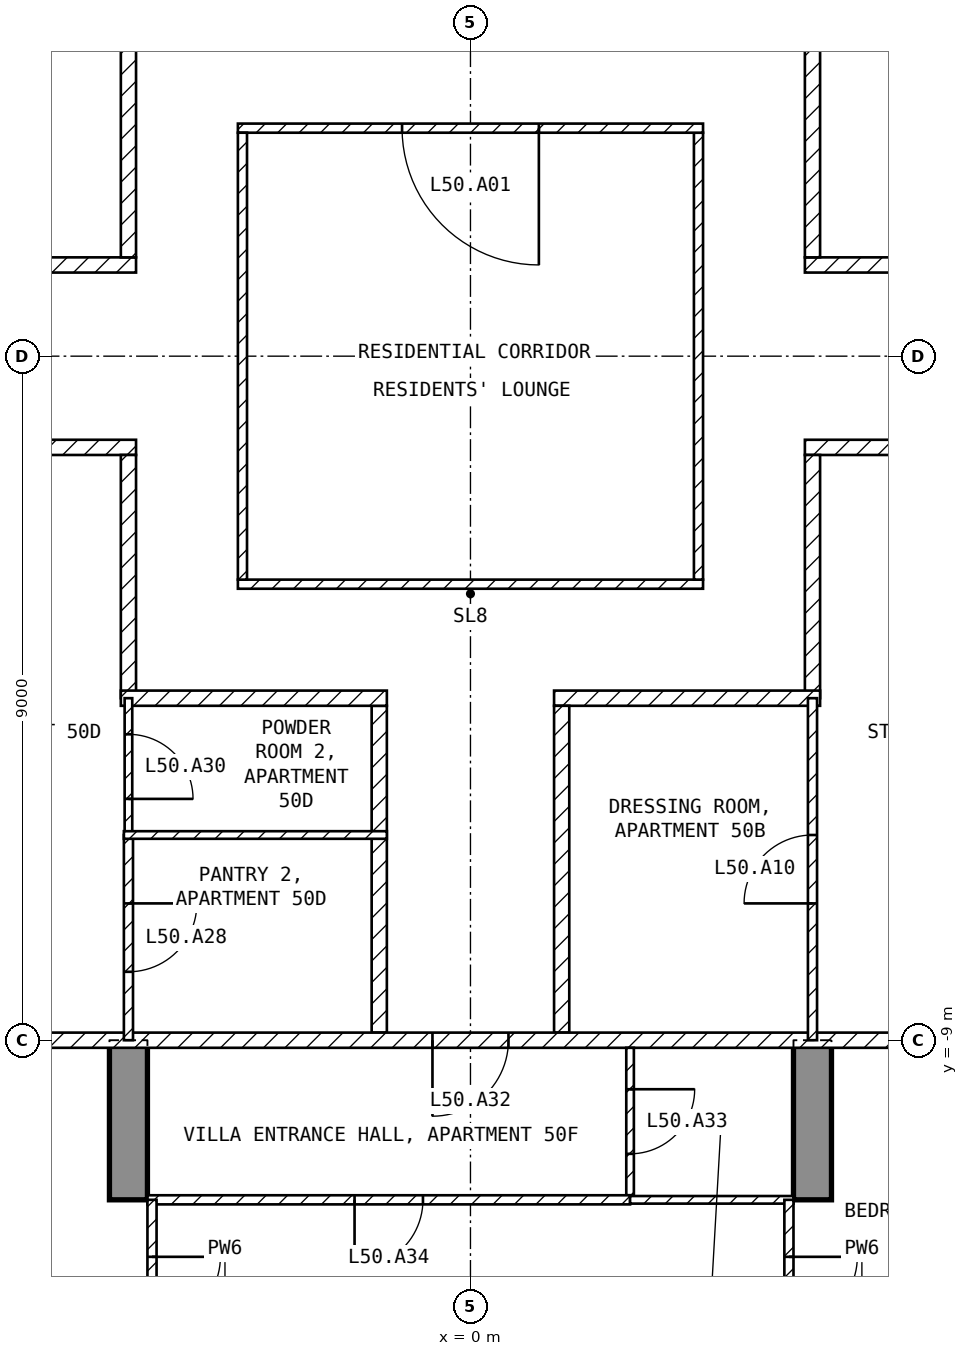
"""IFC4 building model, lengths in metres.
Left out: names, types, materials, properties, quantities, classifications, styles, units other than length and angle.
Written with IfcOpenShell. Run it as: python <this file> out.ifc"""

import sys

from ifc_helpers import new_model, si_unit, direction, frame, frame_2d, origin, place, context, subcontext, project, spatial, polyline, rectangle, outline, extrude, element, fill, save


model = new_model("IFC4")
c1 = context("Model", 3, precision=1e-05, world=origin(), true_north=direction((0.0, 1.0)))
c2 = subcontext(c1, "Body", "Model", "MODEL_VIEW")
j1 = project(units=[si_unit("LENGTHUNIT", "METRE"), si_unit("PLANEANGLEUNIT", "RADIAN")], contexts=[c1])
p1 = place(None, origin())
s1 = spatial("IfcSite", under=j1, at=p1, CompositionType="ELEMENT")
p2 = place(p1, origin())
s2 = spatial("IfcBuilding", under=s1, at=p2, CompositionType="ELEMENT")
p3 = place(p2, frame((0.0, 0.0, 201.6)))
s3 = spatial("IfcBuildingStorey", under=s2, at=p3, CompositionType="ELEMENT", Elevation=201.6)
for number, where, z_axis, x_axis in (
    (1, (-4.75, -20.225, -0.25), (1.0, 0.0, 0.0), (0.0, 1.0, 0.0)),
    (2, (4.25, -20.225, -0.25), (1.0, 0.0, 0.0), (0.0, 1.0, 0.0)),
):
    element("IfcWall", number, at=place(p3, frame(where, z_axis=z_axis, x_axis=x_axis)), inside=s3, PredefinedType="SHEAR", context=c2, shape_type="SweptSolid", body=[
        extrude(outline(polyline([(0.0, 0.0), (6.725, 0.0), (6.725, 2.65), (9.125, 2.65), (9.125, 0.0), (11.225, 0.0), (11.225, 3.5), (0.0, 3.5), (0.0, 0.0)])), origin(), (0.0, 0.0, 1.0), 0.5),
    ])
p4 = place(p3, frame((-3.06, -3.0, 0.0), z_axis=(0.0, 0.0, 1.0), x_axis=(1.0, 0.0, 0.0)))
e3 = element("IfcWall", 3, at=p4, inside=s3, PredefinedType="PARTITIONING", context=c2, shape_type="SweptSolid", body=[
    extrude(rectangle(XDim=6.12, YDim=0.12, at=frame_2d((3.06, 0.0))), origin(), (0.0, 0.0, 1.0), 3.25),
])
p5 = place(p3, frame((3.0, -2.94, 0.0), z_axis=(0.0, 0.0, 1.0), x_axis=(0.0, 1.0, 0.0)))
e4 = element("IfcWall", 4, at=p5, inside=s3, PredefinedType="PARTITIONING", context=c2, shape_type="SweptSolid", body=[
    extrude(rectangle(XDim=5.88, YDim=0.12, at=frame_2d((2.94, 0.0))), origin(), (0.0, 0.0, 1.0), 3.25),
])
p6 = place(p3, frame((3.06, 3.0, 0.0), z_axis=(0.0, 0.0, 1.0), x_axis=(-1.0, 0.0, 0.0)))
e5 = element("IfcWall", 5, at=p6, inside=s3, PredefinedType="PARTITIONING", context=c2, shape_type="SweptSolid", body=[
    extrude(rectangle(XDim=6.12, YDim=0.12, at=frame_2d((3.06, 0.0))), origin(), (0.0, 0.0, 1.0), 3.25),
])
p7 = place(p6, frame((2.16, 0.0, 0.0)))
e6 = element("IfcOpeningElement", 6, at=p7, cuts=e5, PredefinedType="OPENING", context=c2, shape_type="SweptSolid", body=[
    extrude(rectangle(XDim=1.8, YDim=2.1, at=frame_2d((0.9, 1.05))), frame((0.0, 0.07, 0.0), z_axis=(0.0, -1.0, 0.0), x_axis=(1.0, 0.0, 0.0)), (0.0, 0.0, 1.0), 0.14),
])
p8 = place(p3, frame((-3.0, 2.94, 0.0), z_axis=(0.0, 0.0, 1.0), x_axis=(0.0, -1.0, 0.0)))
e7 = element("IfcWall", 7, at=p8, inside=s3, PredefinedType="PARTITIONING", context=c2, shape_type="SweptSolid", body=[
    extrude(rectangle(XDim=5.88, YDim=0.12, at=frame_2d((2.94, 0.0))), origin(), (0.0, 0.0, 1.0), 3.25),
])
p9 = place(p3, frame((4.4, 1.2, 0.0), z_axis=(0.0, 0.0, 1.0), x_axis=(1.0, 0.0, 0.0)))
e8 = element("IfcWall", 8, at=p9, inside=s3, PredefinedType="PARTITIONING", context=c2, shape_type="SweptSolid", body=[
    extrude(rectangle(XDim=17.2, YDim=0.2, at=frame_2d((8.6, 0.0))), origin(), (0.0, 0.0, 1.0), 3.25),
])
p10 = place(p9, frame((12.275, 0.0, 0.0)))
e9 = element("IfcOpeningElement", 9, at=p10, cuts=e8, PredefinedType="OPENING", context=c2, shape_type="SweptSolid", body=[
    extrude(rectangle(XDim=1.0, YDim=2.1, at=frame_2d((0.5, 1.05))), frame((0.0, 0.11, 0.0), z_axis=(0.0, -1.0, 0.0), x_axis=(1.0, 0.0, 0.0)), (0.0, 0.0, 1.0), 0.22),
])
p11 = place(p3, frame((4.5, 4.5, 0.0), z_axis=(0.0, 0.0, 1.0), x_axis=(0.0, -1.0, 0.0)))
e10 = element("IfcWall", 10, at=p11, inside=s3, PredefinedType="PARTITIONING", context=c2, shape_type="SweptSolid", body=[
    extrude(rectangle(XDim=3.2, YDim=0.2, at=frame_2d((1.6, 0.0))), origin(), (0.0, 0.0, 1.0), 3.25),
])
p12 = place(p3, frame((21.6, -1.2, 0.0), z_axis=(0.0, 0.0, 1.0), x_axis=(-1.0, 0.0, 0.0)))
e11 = element("IfcWall", 11, at=p12, inside=s3, PredefinedType="PARTITIONING", context=c2, shape_type="SweptSolid", body=[
    extrude(rectangle(XDim=17.2, YDim=0.2, at=frame_2d((8.6, 0.0))), origin(), (0.0, 0.0, 1.0), 3.25),
])
p13 = place(p12, frame((7.75, 0.0, 0.0)))
e12 = element("IfcOpeningElement", 12, at=p13, cuts=e11, PredefinedType="OPENING", context=c2, shape_type="SweptSolid", body=[
    extrude(rectangle(XDim=1.0, YDim=2.1, at=frame_2d((0.5, 1.05))), frame((0.0, 0.11, 0.0), z_axis=(0.0, -1.0, 0.0), x_axis=(1.0, 0.0, 0.0)), (0.0, 0.0, 1.0), 0.22),
])
p14 = place(p3, frame((4.5, -1.3, 0.0), z_axis=(0.0, 0.0, 1.0), x_axis=(0.0, -1.0, 0.0)))
e13 = element("IfcWall", 13, at=p14, inside=s3, PredefinedType="PARTITIONING", context=c2, shape_type="SweptSolid", body=[
    extrude(rectangle(XDim=3.2, YDim=0.2, at=frame_2d((1.6, 0.0))), origin(), (0.0, 0.0, 1.0), 3.25),
])
p15 = place(p3, frame((4.6, -4.5, 0.0), z_axis=(0.0, 0.0, 1.0), x_axis=(-1.0, 0.0, 0.0)))
e14 = element("IfcWall", 14, at=p15, inside=s3, PredefinedType="PARTITIONING", context=c2, shape_type="SweptSolid", body=[
    extrude(rectangle(XDim=3.5, YDim=0.2, at=frame_2d((1.75, 0.0))), origin(), (0.0, 0.0, 1.0), 3.25),
])
p16 = place(p3, frame((1.2, -4.6, 0.0), z_axis=(0.0, 0.0, 1.0), x_axis=(0.0, -1.0, 0.0)))
e15 = element("IfcWall", 15, at=p16, inside=s3, PredefinedType="PARTITIONING", context=c2, shape_type="SweptSolid", body=[
    extrude(rectangle(XDim=4.3, YDim=0.2, at=frame_2d((2.15, 0.0))), origin(), (0.0, 0.0, 1.0), 3.25),
])
p17 = place(p3, frame((-21.6, 1.2, 0.0), z_axis=(0.0, 0.0, 1.0), x_axis=(1.0, 0.0, 0.0)))
e16 = element("IfcWall", 16, at=p17, inside=s3, PredefinedType="PARTITIONING", context=c2, shape_type="SweptSolid", body=[
    extrude(rectangle(XDim=17.2, YDim=0.2, at=frame_2d((8.6, 0.0))), origin(), (0.0, 0.0, 1.0), 3.25),
])
p18 = place(p17, frame((7.75, 0.0, 0.0)))
e17 = element("IfcOpeningElement", 17, at=p18, cuts=e16, PredefinedType="OPENING", context=c2, shape_type="SweptSolid", body=[
    extrude(rectangle(XDim=1.0, YDim=2.1, at=frame_2d((0.5, 1.05))), frame((0.0, 0.11, 0.0), z_axis=(0.0, -1.0, 0.0), x_axis=(1.0, 0.0, 0.0)), (0.0, 0.0, 1.0), 0.22),
])
p19 = place(p3, frame((-4.5, 1.3, 0.0), z_axis=(0.0, 0.0, 1.0), x_axis=(0.0, 1.0, 0.0)))
e18 = element("IfcWall", 18, at=p19, inside=s3, PredefinedType="PARTITIONING", context=c2, shape_type="SweptSolid", body=[
    extrude(rectangle(XDim=3.2, YDim=0.2, at=frame_2d((1.6, 0.0))), origin(), (0.0, 0.0, 1.0), 3.25),
])
p20 = place(p3, frame((-4.4, -1.2, 0.0), z_axis=(0.0, 0.0, 1.0), x_axis=(-1.0, 0.0, 0.0)))
e19 = element("IfcWall", 19, at=p20, inside=s3, PredefinedType="PARTITIONING", context=c2, shape_type="SweptSolid", body=[
    extrude(rectangle(XDim=17.2, YDim=0.2, at=frame_2d((8.6, 0.0))), origin(), (0.0, 0.0, 1.0), 3.25),
])
p21 = place(p20, frame((9.125, 0.0, 0.0)))
e20 = element("IfcOpeningElement", 20, at=p21, cuts=e19, PredefinedType="OPENING", context=c2, shape_type="SweptSolid", body=[
    extrude(rectangle(XDim=1.0, YDim=2.1, at=frame_2d((0.5, 1.05))), frame((0.0, 0.11, 0.0), z_axis=(0.0, -1.0, 0.0), x_axis=(1.0, 0.0, 0.0)), (0.0, 0.0, 1.0), 0.22),
])
p22 = place(p3, frame((-4.5, -4.5, 0.0), z_axis=(0.0, 0.0, 1.0), x_axis=(0.0, 1.0, 0.0)))
e21 = element("IfcWall", 21, at=p22, inside=s3, PredefinedType="PARTITIONING", context=c2, shape_type="SweptSolid", body=[
    extrude(rectangle(XDim=3.2, YDim=0.2, at=frame_2d((1.6, 0.0))), origin(), (0.0, 0.0, 1.0), 3.25),
])
p23 = place(p3, frame((-1.2, -8.9, 0.0), z_axis=(0.0, 0.0, 1.0), x_axis=(0.0, 1.0, 0.0)))
e22 = element("IfcWall", 22, at=p23, inside=s3, PredefinedType="PARTITIONING", context=c2, shape_type="SweptSolid", body=[
    extrude(rectangle(XDim=4.3, YDim=0.2, at=frame_2d((2.15, 0.0))), origin(), (0.0, 0.0, 1.0), 3.25),
])
p24 = place(p3, frame((-1.1, -4.5, 0.0), z_axis=(0.0, 0.0, 1.0), x_axis=(-1.0, 0.0, 0.0)))
e23 = element("IfcWall", 23, at=p24, inside=s3, PredefinedType="PARTITIONING", context=c2, shape_type="SweptSolid", body=[
    extrude(rectangle(XDim=3.5, YDim=0.2, at=frame_2d((1.75, 0.0))), origin(), (0.0, 0.0, 1.0), 3.25),
])
p25 = place(p3, frame((8.92, -9.0, 0.0), z_axis=(0.0, 0.0, 1.0), x_axis=(-1.0, 0.0, 0.0)))
e24 = element("IfcWall", 24, at=p25, inside=s3, PredefinedType="PARTITIONING", context=c2, shape_type="SweptSolid", body=[
    extrude(rectangle(XDim=17.84, YDim=0.2, at=frame_2d((8.92, 0.0))), origin(), (0.0, 0.0, 1.0), 3.25),
])
p26 = place(p25, frame((8.42, 0.0, 0.0)))
e25 = element("IfcOpeningElement", 25, at=p26, cuts=e24, PredefinedType="OPENING", context=c2, shape_type="SweptSolid", body=[
    extrude(rectangle(XDim=1.0, YDim=2.1, at=frame_2d((0.5, 1.05))), frame((0.0, 0.11, 0.0), z_axis=(0.0, -1.0, 0.0), x_axis=(1.0, 0.0, 0.0)), (0.0, 0.0, 1.0), 0.22),
])
p27 = place(p3, frame((4.5, -9.0, 0.0), z_axis=(0.0, 0.0, 1.0), x_axis=(0.0, 1.0, 0.0)))
e26 = element("IfcWall", 26, at=p27, inside=s3, PredefinedType="PARTITIONING", context=c2, shape_type="SweptSolid", body=[
    extrude(rectangle(XDim=4.5, YDim=0.12, at=frame_2d((2.25, 0.0))), origin(), (0.0, 0.0, 1.0), 3.25),
])
p28 = place(p27, frame((1.8, 0.0, 0.0)))
e27 = element("IfcOpeningElement", 27, at=p28, cuts=e26, PredefinedType="OPENING", context=c2, shape_type="SweptSolid", body=[
    extrude(rectangle(XDim=0.9, YDim=2.1, at=frame_2d((0.45, 1.05))), frame((0.0, 0.07, 0.0), z_axis=(0.0, -1.0, 0.0), x_axis=(1.0, 0.0, 0.0)), (0.0, 0.0, 1.0), 0.14),
])
p29 = place(p3, frame((-4.5, -4.5, 0.0), z_axis=(0.0, 0.0, 1.0), x_axis=(0.0, -1.0, 0.0)))
e28 = element("IfcWall", 28, at=p29, inside=s3, PredefinedType="PARTITIONING", context=c2, shape_type="SweptSolid", body=[
    extrude(rectangle(XDim=1.8, YDim=0.1, at=frame_2d((0.9, 0.0))), origin(), (0.0, 0.0, 1.0), 3.25),
])
p30 = place(p29, frame((0.475, 0.0, 0.0)))
e29 = element("IfcOpeningElement", 29, at=p30, cuts=e28, PredefinedType="OPENING", context=c2, shape_type="SweptSolid", body=[
    extrude(rectangle(XDim=0.85, YDim=2.1, at=frame_2d((0.425, 1.05))), frame((0.0, 0.06, 0.0), z_axis=(0.0, -1.0, 0.0), x_axis=(1.0, 0.0, 0.0)), (0.0, 0.0, 1.0), 0.12),
])
p31 = place(p3, frame((-4.5, -6.3, 0.0), z_axis=(0.0, 0.0, 1.0), x_axis=(0.0, -1.0, 0.0)))
e30 = element("IfcWall", 30, at=p31, inside=s3, PredefinedType="PARTITIONING", context=c2, shape_type="SweptSolid", body=[
    extrude(rectangle(XDim=2.7, YDim=0.12, at=frame_2d((1.35, 0.0))), origin(), (0.0, 0.0, 1.0), 3.25),
])
p32 = place(p31, frame((0.9, 0.0, 0.0)))
e31 = element("IfcOpeningElement", 31, at=p32, cuts=e30, PredefinedType="OPENING", context=c2, shape_type="SweptSolid", body=[
    extrude(rectangle(XDim=0.9, YDim=2.1, at=frame_2d((0.45, 1.05))), frame((0.0, 0.07, 0.0), z_axis=(0.0, -1.0, 0.0), x_axis=(1.0, 0.0, 0.0)), (0.0, 0.0, 1.0), 0.14),
])
p33 = place(p3, frame((-1.1, -6.3, 0.0), z_axis=(0.0, 0.0, 1.0), x_axis=(-1.0, 0.0, 0.0)))
e32 = element("IfcWall", 32, at=p33, inside=s3, PredefinedType="PARTITIONING", context=c2, shape_type="SweptSolid", body=[
    extrude(rectangle(XDim=3.46, YDim=0.1, at=frame_2d((1.73, 0.0))), origin(), (0.0, 0.0, 1.0), 3.25),
])
p34 = place(p3, frame((2.1, -9.1, 0.0), z_axis=(0.0, 0.0, 1.0), x_axis=(0.0, -1.0, 0.0)))
e33 = element("IfcWall", 33, at=p34, inside=s3, PredefinedType="PARTITIONING", context=c2, shape_type="SweptSolid", body=[
    extrude(rectangle(XDim=1.94, YDim=0.1, at=frame_2d((0.97, 0.0))), origin(), (0.0, 0.0, 1.0), 3.25),
])
p35 = place(p34, frame((0.545, 0.0, 0.0)))
e34 = element("IfcOpeningElement", 34, at=p35, cuts=e33, PredefinedType="OPENING", context=c2, shape_type="SweptSolid", body=[
    extrude(rectangle(XDim=0.85, YDim=2.1, at=frame_2d((0.425, 1.05))), frame((0.0, 0.06, 0.0), z_axis=(0.0, -1.0, 0.0), x_axis=(1.0, 0.0, 0.0)), (0.0, 0.0, 1.0), 0.12),
])
p36 = place(p3, frame((2.1, -11.1, 0.0), z_axis=(0.0, 0.0, 1.0), x_axis=(-1.0, 0.0, 0.0)))
e35 = element("IfcWall", 35, at=p36, inside=s3, PredefinedType="PARTITIONING", context=c2, shape_type="SweptSolid", body=[
    extrude(rectangle(XDim=6.35, YDim=0.12, at=frame_2d((3.175, 0.0))), origin(), (0.0, 0.0, 1.0), 3.25),
])
p37 = place(p36, frame((2.725, 0.0, 0.0)))
e36 = element("IfcOpeningElement", 36, at=p37, cuts=e35, PredefinedType="OPENING", context=c2, shape_type="SweptSolid", body=[
    extrude(rectangle(XDim=0.9, YDim=2.1, at=frame_2d((0.45, 1.05))), frame((0.0, 0.07, 0.0), z_axis=(0.0, -1.0, 0.0), x_axis=(1.0, 0.0, 0.0)), (0.0, 0.0, 1.0), 0.14),
])
p38 = place(p3, frame((4.25, -11.1, 0.0), z_axis=(0.0, 0.0, 1.0), x_axis=(-1.0, 0.0, 0.0)))
e37 = element("IfcWall", 37, at=p38, inside=s3, PredefinedType="PARTITIONING", context=c2, shape_type="SweptSolid", body=[
    extrude(rectangle(XDim=2.15, YDim=0.1, at=frame_2d((1.075, 0.0))), origin(), (0.0, 0.0, 1.0), 3.25),
])
p39 = place(p3, frame((4.19, -11.1, 0.0), z_axis=(0.0, 0.0, 1.0), x_axis=(0.0, -1.0, 0.0)))
e38 = element("IfcWall", 38, at=p39, inside=s3, PredefinedType="PARTITIONING", context=c2, shape_type="SweptSolid", body=[
    extrude(rectangle(XDim=2.4, YDim=0.12, at=frame_2d((1.2, 0.0))), origin(), (0.0, 0.0, 1.0), 2.4),
])
p40 = place(p39, frame((0.75, 0.0, 0.0)))
e39 = element("IfcOpeningElement", 39, at=p40, cuts=e38, PredefinedType="OPENING", context=c2, shape_type="SweptSolid", body=[
    extrude(rectangle(XDim=0.9, YDim=2.1, at=frame_2d((0.45, 1.05))), frame((0.0, 0.07, 0.0), z_axis=(0.0, -1.0, 0.0), x_axis=(1.0, 0.0, 0.0)), (0.0, 0.0, 1.0), 0.14),
])
p41 = place(p3, frame((-4.19, -11.1, 0.0), z_axis=(0.0, 0.0, 1.0), x_axis=(0.0, -1.0, 0.0)))
e40 = element("IfcWall", 40, at=p41, inside=s3, PredefinedType="PARTITIONING", context=c2, shape_type="SweptSolid", body=[
    extrude(rectangle(XDim=2.4, YDim=0.12, at=frame_2d((1.2, 0.0))), origin(), (0.0, 0.0, 1.0), 2.4),
])
p42 = place(p41, frame((0.75, 0.0, 0.0)))
e41 = element("IfcOpeningElement", 41, at=p42, cuts=e40, PredefinedType="OPENING", context=c2, shape_type="SweptSolid", body=[
    extrude(rectangle(XDim=0.9, YDim=2.1, at=frame_2d((0.45, 1.05))), frame((0.0, 0.07, 0.0), z_axis=(0.0, -1.0, 0.0), x_axis=(1.0, 0.0, 0.0)), (0.0, 0.0, 1.0), 0.14),
])
p43 = place(p7, origin())
e42 = element("IfcDoor", 42, at=p43, inside=s3, OperationType="SINGLE_SWING_LEFT", PredefinedType="DOOR", context=c2, shape_type="SweptSolid", body=[
    extrude(rectangle(XDim=1.8, YDim=2.1, at=frame_2d((0.9, 1.05))), frame((0.0, 0.025, 0.0), z_axis=(0.0, -1.0, 0.0), x_axis=(1.0, 0.0, 0.0)), (0.0, 0.0, 1.0), 0.05),
])
fill(e6, e42)
p44 = place(p28, origin())
e43 = element("IfcDoor", 43, at=p44, inside=s3, OperationType="SINGLE_SWING_LEFT", PredefinedType="DOOR", context=c2, shape_type="SweptSolid", body=[
    extrude(rectangle(XDim=0.9, YDim=2.1, at=frame_2d((0.45, 1.05))), frame((0.0, 0.025, 0.0), z_axis=(0.0, -1.0, 0.0), x_axis=(1.0, 0.0, 0.0)), (0.0, 0.0, 1.0), 0.05),
])
fill(e27, e43)
p45 = place(p32, origin())
e44 = element("IfcDoor", 44, at=p45, inside=s3, OperationType="SINGLE_SWING_LEFT", PredefinedType="DOOR", context=c2, shape_type="SweptSolid", body=[
    extrude(rectangle(XDim=0.9, YDim=2.1, at=frame_2d((0.45, 1.05))), frame((0.0, 0.025, 0.0), z_axis=(0.0, -1.0, 0.0), x_axis=(1.0, 0.0, 0.0)), (0.0, 0.0, 1.0), 0.05),
])
fill(e31, e44)
p46 = place(p30, origin())
e45 = element("IfcDoor", 45, at=p46, inside=s3, OperationType="SINGLE_SWING_RIGHT", PredefinedType="DOOR", context=c2, shape_type="SweptSolid", body=[
    extrude(rectangle(XDim=0.85, YDim=2.1, at=frame_2d((0.425, 1.05))), frame((0.0, 0.025, 0.0), z_axis=(0.0, -1.0, 0.0), x_axis=(1.0, 0.0, 0.0)), (0.0, 0.0, 1.0), 0.05),
])
fill(e29, e45)
p47 = place(p26, origin())
e46 = element("IfcDoor", 46, at=p47, inside=s3, OperationType="SINGLE_SWING_RIGHT", PredefinedType="DOOR", context=c2, shape_type="SweptSolid", body=[
    extrude(rectangle(XDim=1.0, YDim=2.1, at=frame_2d((0.5, 1.05))), frame((0.0, 0.025, 0.0), z_axis=(0.0, -1.0, 0.0), x_axis=(1.0, 0.0, 0.0)), (0.0, 0.0, 1.0), 0.05),
])
fill(e25, e46)
p48 = place(p35, origin())
e47 = element("IfcDoor", 47, at=p48, inside=s3, OperationType="SINGLE_SWING_LEFT", PredefinedType="DOOR", context=c2, shape_type="SweptSolid", body=[
    extrude(rectangle(XDim=0.85, YDim=2.1, at=frame_2d((0.425, 1.05))), frame((0.0, 0.025, 0.0), z_axis=(0.0, -1.0, 0.0), x_axis=(1.0, 0.0, 0.0)), (0.0, 0.0, 1.0), 0.05),
])
fill(e34, e47)
p49 = place(p37, origin())
e48 = element("IfcDoor", 48, at=p49, inside=s3, OperationType="SINGLE_SWING_RIGHT", PredefinedType="DOOR", context=c2, shape_type="SweptSolid", body=[
    extrude(rectangle(XDim=0.9, YDim=2.1, at=frame_2d((0.45, 1.05))), frame((0.0, 0.025, 0.0), z_axis=(0.0, -1.0, 0.0), x_axis=(1.0, 0.0, 0.0)), (0.0, 0.0, 1.0), 0.05),
])
fill(e36, e48)
p50 = place(p40, origin())
e49 = element("IfcDoor", 49, at=p50, inside=s3, OperationType="SINGLE_SWING_LEFT", PredefinedType="DOOR", context=c2, shape_type="SweptSolid", body=[
    extrude(rectangle(XDim=0.9, YDim=2.1, at=frame_2d((0.45, 1.05))), frame((0.0, 0.025, 0.0), z_axis=(0.0, -1.0, 0.0), x_axis=(1.0, 0.0, 0.0)), (0.0, 0.0, 1.0), 0.05),
])
fill(e39, e49)
p51 = place(p42, origin())
e50 = element("IfcDoor", 50, at=p51, inside=s3, OperationType="SINGLE_SWING_LEFT", PredefinedType="DOOR", context=c2, shape_type="SweptSolid", body=[
    extrude(rectangle(XDim=0.9, YDim=2.1, at=frame_2d((0.45, 1.05))), frame((0.0, 0.025, 0.0), z_axis=(0.0, -1.0, 0.0), x_axis=(1.0, 0.0, 0.0)), (0.0, 0.0, 1.0), 0.05),
])
fill(e41, e50)
save(model, sys.argv[1])
